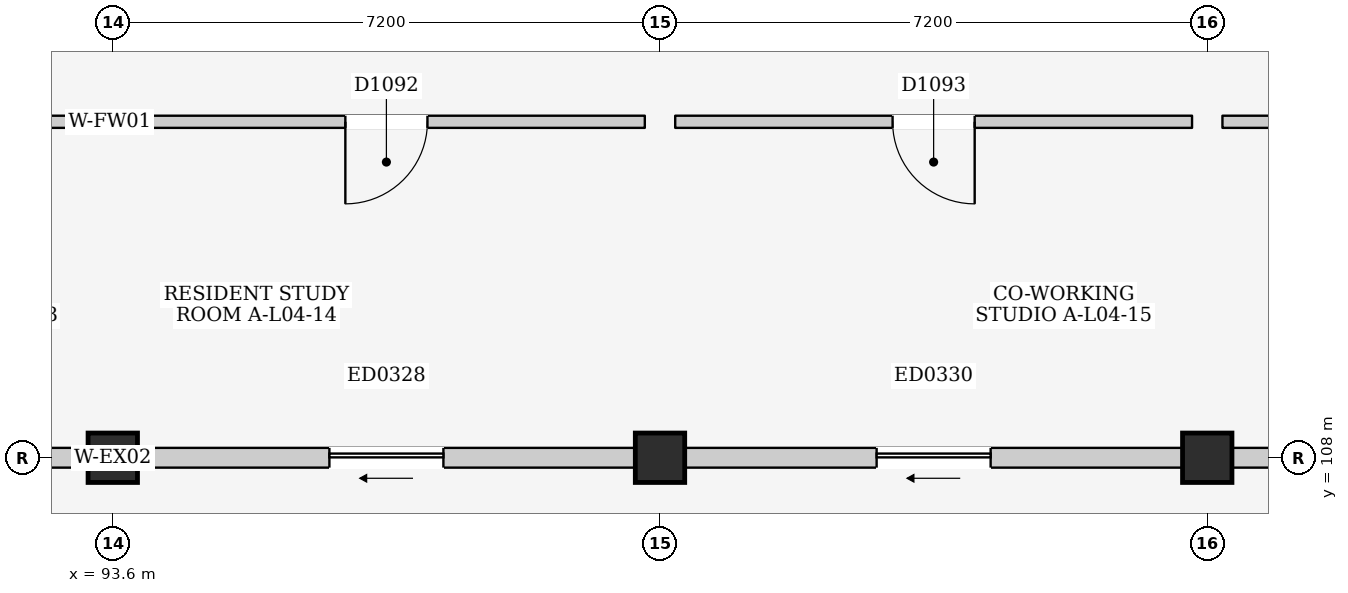
"""IFC4 building model, lengths in metres.
Left out: names, types, materials, properties, quantities, classifications, styles, units other than length and angle.
Written with IfcOpenShell. Run it as: python <this file> out.ifc"""

import sys

from ifc_helpers import new_model, si_unit, direction, frame, frame_2d, origin, origin_2d, place, context, subcontext, project, spatial, rectangle, extrude, element, fill, save


model = new_model("IFC4")
c1 = context("Model", 3, precision=1e-05, world=origin(), true_north=direction((0.0, 1.0)))
c2 = subcontext(c1, "Body", "Model", "MODEL_VIEW")
j1 = project(units=[si_unit("LENGTHUNIT", "METRE"), si_unit("PLANEANGLEUNIT", "RADIAN")], contexts=[c1])
p1 = place(None, origin())
s1 = spatial("IfcSite", under=j1, at=p1, CompositionType="ELEMENT")
p2 = place(p1, origin())
s2 = spatial("IfcBuilding", under=s1, at=p2, CompositionType="ELEMENT")
p3 = place(p2, frame((0.0, 0.0, 15.4)))
s3 = spatial("IfcBuildingStorey", under=s2, at=p3, CompositionType="ELEMENT", Elevation=15.4)
for number, where, z_axis, x_axis in (
    (1, (93.6, 108.0, 0.0), (0.0, 0.0, 1.0), (1.0, 0.0, 0.0)),
    (2, (100.8, 108.0, 0.0), (0.0, 0.0, 1.0), (1.0, 0.0, 0.0)),
    (3, (108.0, 108.0, 0.0), (0.0, 0.0, 1.0), (1.0, 0.0, 0.0)),
):
    element("IfcColumn", number, at=place(p3, frame(where, z_axis=z_axis, x_axis=x_axis)), inside=s3, PredefinedType="COLUMN", context=c2, shape_type="SweptSolid", body=[
        extrude(rectangle(XDim=0.65, YDim=0.65, at=origin_2d()), origin(), (0.0, 0.0, 1.0), 3.2),
    ])
p4 = place(p3, frame((86.725, 108.0, 0.0), z_axis=(0.0, 0.0, 1.0), x_axis=(1.0, 0.0, 0.0)))
e4 = element("IfcWall", 4, at=p4, inside=s3, PredefinedType="ELEMENTEDWALL", context=c2, shape_type="SweptSolid", body=[
    extrude(rectangle(XDim=6.55, YDim=0.26, at=frame_2d((3.275, 0.0))), origin(), (0.0, 0.0, 1.0), 2.285),
])
p5 = place(p4, frame((2.525, 0.0, 0.0)))
e5 = element("IfcOpeningElement", 5, at=p5, cuts=e4, PredefinedType="OPENING", context=c2, shape_type="SweptSolid", body=[
    extrude(rectangle(XDim=1.5, YDim=2.12, at=frame_2d((0.75, 1.06))), frame((0.0, 0.145, 0.0), z_axis=(0.0, -1.0, 0.0), x_axis=(1.0, 0.0, 0.0)), (0.0, 0.0, 1.0), 0.29),
])
p6 = place(p3, frame((93.925, 108.0, 0.0), z_axis=(0.0, 0.0, 1.0), x_axis=(1.0, 0.0, 0.0)))
e6 = element("IfcWall", 6, at=p6, inside=s3, PredefinedType="ELEMENTEDWALL", context=c2, shape_type="SweptSolid", body=[
    extrude(rectangle(XDim=6.55, YDim=0.26, at=frame_2d((3.275, 0.0))), origin(), (0.0, 0.0, 1.0), 2.285),
])
p7 = place(p6, frame((2.525, 0.0, 0.0)))
e7 = element("IfcOpeningElement", 7, at=p7, cuts=e6, PredefinedType="OPENING", context=c2, shape_type="SweptSolid", body=[
    extrude(rectangle(XDim=1.5, YDim=2.12, at=frame_2d((0.75, 1.06))), frame((0.0, 0.145, 0.0), z_axis=(0.0, -1.0, 0.0), x_axis=(1.0, 0.0, 0.0)), (0.0, 0.0, 1.0), 0.29),
])
p8 = place(p3, frame((101.125, 108.0, 0.0), z_axis=(0.0, 0.0, 1.0), x_axis=(1.0, 0.0, 0.0)))
e8 = element("IfcWall", 8, at=p8, inside=s3, PredefinedType="ELEMENTEDWALL", context=c2, shape_type="SweptSolid", body=[
    extrude(rectangle(XDim=6.55, YDim=0.26, at=frame_2d((3.275, 0.0))), origin(), (0.0, 0.0, 1.0), 2.285),
])
p9 = place(p8, frame((2.525, 0.0, 0.0)))
e9 = element("IfcOpeningElement", 9, at=p9, cuts=e8, PredefinedType="OPENING", context=c2, shape_type="SweptSolid", body=[
    extrude(rectangle(XDim=1.5, YDim=2.12, at=frame_2d((0.75, 1.06))), frame((0.0, 0.145, 0.0), z_axis=(0.0, -1.0, 0.0), x_axis=(1.0, 0.0, 0.0)), (0.0, 0.0, 1.0), 0.29),
])
p10 = place(p3, frame((108.325, 108.0, 0.0), z_axis=(0.0, 0.0, 1.0), x_axis=(1.0, 0.0, 0.0)))
e10 = element("IfcWall", 10, at=p10, inside=s3, PredefinedType="ELEMENTEDWALL", context=c2, shape_type="SweptSolid", body=[
    extrude(rectangle(XDim=6.55, YDim=0.26, at=frame_2d((3.275, 0.0))), origin(), (0.0, 0.0, 1.0), 2.285),
])
p11 = place(p10, frame((2.525, 0.0, 0.0)))
e11 = element("IfcOpeningElement", 11, at=p11, cuts=e10, PredefinedType="OPENING", context=c2, shape_type="SweptSolid", body=[
    extrude(rectangle(XDim=1.5, YDim=2.12, at=frame_2d((0.75, 1.06))), frame((0.0, 0.145, 0.0), z_axis=(0.0, -1.0, 0.0), x_axis=(1.0, 0.0, 0.0)), (0.0, 0.0, 1.0), 0.29),
])
p12 = place(p3, frame((86.6, 112.42, 0.0), z_axis=(0.0, 0.0, 1.0), x_axis=(1.0, 0.0, 0.0)))
e12 = element("IfcWall", 12, at=p12, inside=s3, PredefinedType="PARTITIONING", context=c2, shape_type="SweptSolid", body=[
    extrude(rectangle(XDim=6.8, YDim=0.16, at=frame_2d((3.4, 0.0))), origin(), (0.0, 0.0, 1.0), 2.95),
])
p13 = place(p12, frame((2.86, 0.0, 0.0)))
e13 = element("IfcOpeningElement", 13, at=p13, cuts=e12, PredefinedType="OPENING", context=c2, shape_type="SweptSolid", body=[
    extrude(rectangle(XDim=1.08, YDim=2.22, at=frame_2d((0.54, 1.11))), frame((0.0, 0.095, 0.0), z_axis=(0.0, -1.0, 0.0), x_axis=(1.0, 0.0, 0.0)), (0.0, 0.0, 1.0), 0.19),
])
p14 = place(p3, frame((93.8, 112.42, 0.0), z_axis=(0.0, 0.0, 1.0), x_axis=(1.0, 0.0, 0.0)))
e14 = element("IfcWall", 14, at=p14, inside=s3, PredefinedType="PARTITIONING", context=c2, shape_type="SweptSolid", body=[
    extrude(rectangle(XDim=6.8, YDim=0.16, at=frame_2d((3.4, 0.0))), origin(), (0.0, 0.0, 1.0), 2.95),
])
p15 = place(p14, frame((2.86, 0.0, 0.0)))
e15 = element("IfcOpeningElement", 15, at=p15, cuts=e14, PredefinedType="OPENING", context=c2, shape_type="SweptSolid", body=[
    extrude(rectangle(XDim=1.08, YDim=2.22, at=frame_2d((0.54, 1.11))), frame((0.0, 0.095, 0.0), z_axis=(0.0, -1.0, 0.0), x_axis=(1.0, 0.0, 0.0)), (0.0, 0.0, 1.0), 0.19),
])
p16 = place(p3, frame((101.0, 112.42, 0.0), z_axis=(0.0, 0.0, 1.0), x_axis=(1.0, 0.0, 0.0)))
e16 = element("IfcWall", 16, at=p16, inside=s3, PredefinedType="PARTITIONING", context=c2, shape_type="SweptSolid", body=[
    extrude(rectangle(XDim=6.8, YDim=0.16, at=frame_2d((3.4, 0.0))), origin(), (0.0, 0.0, 1.0), 2.95),
])
p17 = place(p16, frame((2.86, 0.0, 0.0)))
e17 = element("IfcOpeningElement", 17, at=p17, cuts=e16, PredefinedType="OPENING", context=c2, shape_type="SweptSolid", body=[
    extrude(rectangle(XDim=1.08, YDim=2.22, at=frame_2d((0.54, 1.11))), frame((0.0, 0.095, 0.0), z_axis=(0.0, -1.0, 0.0), x_axis=(1.0, 0.0, 0.0)), (0.0, 0.0, 1.0), 0.19),
])
p18 = place(p3, frame((108.2, 112.42, 0.0), z_axis=(0.0, 0.0, 1.0), x_axis=(1.0, 0.0, 0.0)))
e18 = element("IfcWall", 18, at=p18, inside=s3, PredefinedType="PARTITIONING", context=c2, shape_type="SweptSolid", body=[
    extrude(rectangle(XDim=6.72, YDim=0.16, at=frame_2d((3.36, 0.0))), origin(), (0.0, 0.0, 1.0), 2.95),
])
p19 = place(p18, frame((2.82, 0.0, 0.0)))
e19 = element("IfcOpeningElement", 19, at=p19, cuts=e18, PredefinedType="OPENING", context=c2, shape_type="SweptSolid", body=[
    extrude(rectangle(XDim=1.08, YDim=2.22, at=frame_2d((0.54, 1.11))), frame((0.0, 0.095, 0.0), z_axis=(0.0, -1.0, 0.0), x_axis=(1.0, 0.0, 0.0)), (0.0, 0.0, 1.0), 0.19),
])
p20 = place(p7, frame((1.5, 0.0, 0.0), z_axis=(0.0, 0.0, 1.0), x_axis=(-1.0, 0.0, 0.0)))
e20 = element("IfcDoor", 20, at=p20, inside=s3, OperationType="SLIDING_TO_LEFT", PredefinedType="DOOR", context=c2, shape_type="SweptSolid", body=[
    extrude(rectangle(XDim=1.5, YDim=2.12, at=frame_2d((0.75, 1.06))), frame((0.0, 0.025, 0.0), z_axis=(0.0, -1.0, 0.0), x_axis=(1.0, 0.0, 0.0)), (0.0, 0.0, 1.0), 0.05),
])
fill(e7, e20)
p21 = place(p9, frame((1.5, 0.0, 0.0), z_axis=(0.0, 0.0, 1.0), x_axis=(-1.0, 0.0, 0.0)))
e21 = element("IfcDoor", 21, at=p21, inside=s3, OperationType="SLIDING_TO_LEFT", PredefinedType="DOOR", context=c2, shape_type="SweptSolid", body=[
    extrude(rectangle(XDim=1.5, YDim=2.12, at=frame_2d((0.75, 1.06))), frame((0.0, 0.025, 0.0), z_axis=(0.0, -1.0, 0.0), x_axis=(1.0, 0.0, 0.0)), (0.0, 0.0, 1.0), 0.05),
])
fill(e9, e21)
p22 = place(p15, frame((1.08, 0.0, 0.0), z_axis=(0.0, 0.0, 1.0), x_axis=(-1.0, 0.0, 0.0)))
e22 = element("IfcDoor", 22, at=p22, inside=s3, OperationType="SINGLE_SWING_RIGHT", PredefinedType="DOOR", context=c2, shape_type="SweptSolid", body=[
    extrude(rectangle(XDim=1.08, YDim=2.22, at=frame_2d((0.54, 1.11))), frame((0.0, 0.025, 0.0), z_axis=(0.0, -1.0, 0.0), x_axis=(1.0, 0.0, 0.0)), (0.0, 0.0, 1.0), 0.05),
])
fill(e15, e22)
p23 = place(p17, frame((1.08, 0.0, 0.0), z_axis=(0.0, 0.0, 1.0), x_axis=(-1.0, 0.0, 0.0)))
e23 = element("IfcDoor", 23, at=p23, inside=s3, OperationType="SINGLE_SWING_LEFT", PredefinedType="DOOR", context=c2, shape_type="SweptSolid", body=[
    extrude(rectangle(XDim=1.08, YDim=2.22, at=frame_2d((0.54, 1.11))), frame((0.0, 0.025, 0.0), z_axis=(0.0, -1.0, 0.0), x_axis=(1.0, 0.0, 0.0)), (0.0, 0.0, 1.0), 0.05),
])
fill(e17, e23)
save(model, sys.argv[1])
